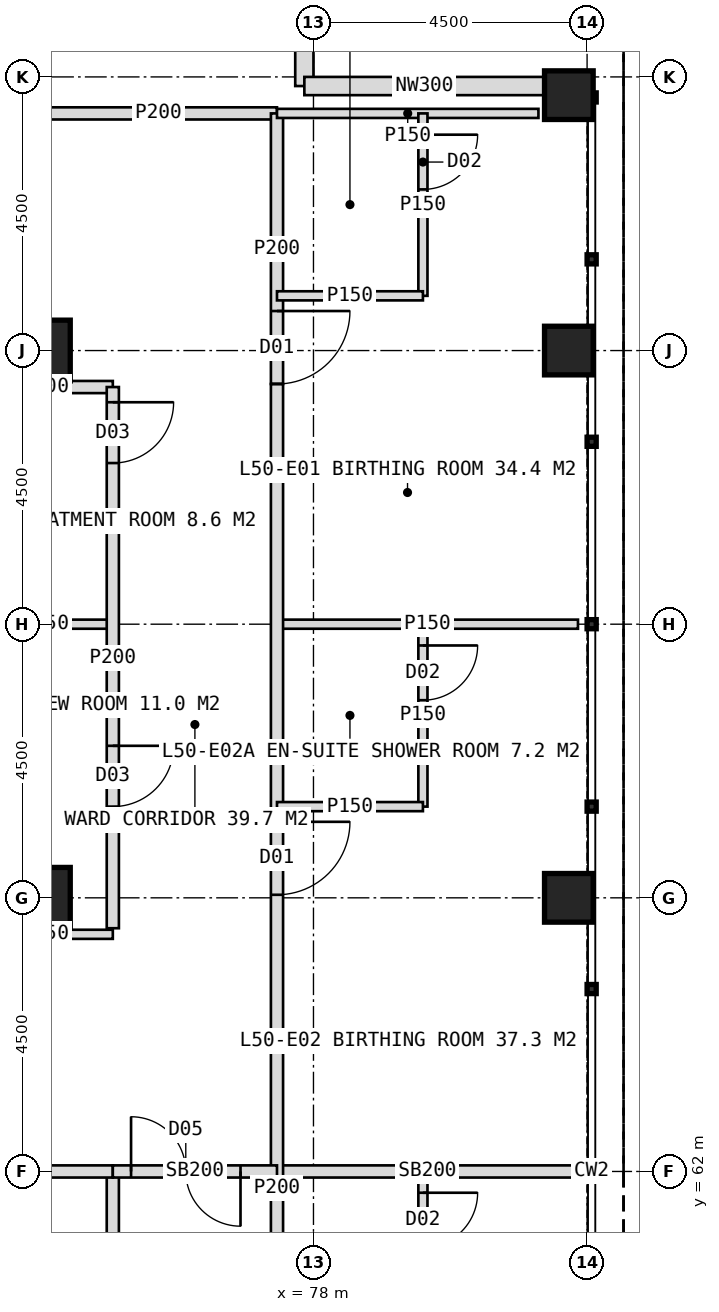
"""IFC4 building model, lengths in metres.
Left out: names, types, materials, properties, quantities, classifications, styles, units other than length and angle.
Written with IfcOpenShell. Run it as: python <this file> out.ifc"""

import sys

from ifc_helpers import new_model, si_unit, direction, frame, frame_2d, origin, origin_2d, place, context, subcontext, project, spatial, rectangle, hollow_rectangle, extrude, element, fill, save


model = new_model("IFC4")
c1 = context("Model", 3, precision=1e-05, world=origin(), true_north=direction((0.0, 1.0)))
c2 = subcontext(c1, "Body", "Model", "MODEL_VIEW")
j1 = project(units=[si_unit("LENGTHUNIT", "METRE"), si_unit("PLANEANGLEUNIT", "RADIAN")], contexts=[c1])
p1 = place(None, origin())
s1 = spatial("IfcSite", under=j1, at=p1, CompositionType="ELEMENT")
p2 = place(p1, origin())
s2 = spatial("IfcBuilding", under=s1, at=p2, CompositionType="ELEMENT")
p3 = place(p2, frame((0.0, 0.0, 209.0)))
s3 = spatial("IfcBuildingStorey", under=s2, at=p3, CompositionType="ELEMENT", Elevation=209.0)
for number, where, z_axis, x_axis in (
    (1, (73.5, 75.5, 0.0), (0.0, 0.0, 1.0), (1.0, 0.0, 0.0)),
    (2, (73.5, 66.5, 0.0), (0.0, 0.0, 1.0), (1.0, 0.0, 0.0)),
):
    element("IfcColumn", number, at=place(p3, frame(where, z_axis=z_axis, x_axis=x_axis)), inside=s3, PredefinedType="COLUMN", context=c2, shape_type="SweptSolid", body=[
        extrude(hollow_rectangle(XDim=1.0, YDim=1.0, WallThickness=0.1, at=origin_2d()), origin(), (0.0, 0.0, 1.0), 4.0),
    ])
for number, where, z_axis, x_axis in (
    (3, (82.2, 66.5, 0.0), (0.0, 0.0, 1.0), (1.0, 0.0, 0.0)),
    (4, (82.2, 75.5, 0.0), (0.0, 0.0, 1.0), (1.0, 0.0, 0.0)),
    (5, (82.2, 79.7, 0.0), (0.0, 0.0, 1.0), (1.0, 0.0, 0.0)),
):
    element("IfcColumn", number, at=place(p3, frame(where, z_axis=z_axis, x_axis=x_axis)), inside=s3, PredefinedType="COLUMN", context=c2, shape_type="SweptSolid", body=[
        extrude(hollow_rectangle(XDim=0.8, YDim=0.8, WallThickness=0.08, at=origin_2d()), origin(), (0.0, 0.0, 1.0), 4.0),
    ])
for number, where, z_axis, x_axis in (
    (6, (77.85, 83.8, 0.0), (0.0, 0.0, 1.0), (0.0, -1.0, 0.0)),
    (7, (77.85, 79.85, 0.0), (0.0, 0.0, 1.0), (1.0, 0.0, 0.0)),
):
    element("IfcWall", number, at=place(p3, frame(where, z_axis=z_axis, x_axis=x_axis)), inside=s3, PredefinedType="ELEMENTEDWALL", context=c2, shape_type="SweptSolid", body=[
        extrude(rectangle(XDim=3.95, YDim=0.3, at=frame_2d((1.975, 0.0))), origin(), (0.0, 0.0, 1.0), 2.85),
    ])
p4 = place(p3, frame((73.5, 79.4, 0.0), z_axis=(0.0, 0.0, 1.0), x_axis=(1.0, 0.0, 0.0)))
e8 = element("IfcWall", 8, at=p4, inside=s3, PredefinedType="PARTITIONING", context=c2, shape_type="SweptSolid", body=[
    extrude(rectangle(XDim=3.9, YDim=0.2, at=frame_2d((1.95, 0.0))), origin(), (0.0, 0.0, 1.0), 2.85),
])
p5 = place(p3, frame((72.5, 74.9, 0.0), z_axis=(0.0, 0.0, 1.0), x_axis=(1.0, 0.0, 0.0)))
e9 = element("IfcWall", 9, at=p5, inside=s3, PredefinedType="PARTITIONING", context=c2, shape_type="SweptSolid", body=[
    extrude(rectangle(XDim=2.2, YDim=0.2, at=frame_2d((1.1, 0.0))), origin(), (0.0, 0.0, 1.0), 3.75),
])
p6 = place(p3, frame((77.4, 71.0, 0.0), z_axis=(0.0, 0.0, 1.0), x_axis=(1.0, 0.0, 0.0)))
e10 = element("IfcWall", 10, at=p6, inside=s3, PredefinedType="PARTITIONING", context=c2, shape_type="SweptSolid", body=[
    extrude(rectangle(XDim=4.95, YDim=0.15, at=frame_2d((2.475, 0.0))), origin(), (0.0, 0.0, 1.0), 3.75),
])
p7 = place(p3, frame((77.4, 62.0, 0.0), z_axis=(0.0, 0.0, 1.0), x_axis=(1.0, 0.0, 0.0)))
e11 = element("IfcWall", 11, at=p7, inside=s3, PredefinedType="SOLIDWALL", context=c2, shape_type="SweptSolid", body=[
    extrude(rectangle(XDim=4.95, YDim=0.2, at=frame_2d((2.475, 0.0))), origin(), (0.0, 0.0, 1.0), 2.95),
])
p8 = place(p3, frame((77.4, 79.4, 0.0), z_axis=(0.0, 0.0, 1.0), x_axis=(0.0, -1.0, 0.0)))
e12 = element("IfcWall", 12, at=p8, inside=s3, PredefinedType="PARTITIONING", context=c2, shape_type="SweptSolid", body=[
    extrude(rectangle(XDim=4.45, YDim=0.2, at=frame_2d((2.225, 0.0))), origin(), (0.0, 0.0, 1.0), 2.85),
])
p9 = place(p8, frame((3.25, 0.0, 0.0)))
e13 = element("IfcOpeningElement", 13, at=p9, cuts=e12, PredefinedType="OPENING", context=c2, shape_type="SweptSolid", body=[
    extrude(rectangle(XDim=1.2, YDim=2.2, at=frame_2d((0.6, 1.1))), frame((0.0, 0.11, 0.0), z_axis=(0.0, -1.0, 0.0), x_axis=(1.0, 0.0, 0.0)), (0.0, 0.0, 1.0), 0.22),
])
p10 = place(p3, frame((77.4, 74.95, 0.0), z_axis=(0.0, 0.0, 1.0), x_axis=(0.0, -1.0, 0.0)))
e14 = element("IfcWall", 14, at=p10, inside=s3, PredefinedType="PARTITIONING", context=c2, shape_type="SweptSolid", body=[
    extrude(rectangle(XDim=26.45, YDim=0.2, at=frame_2d((13.225, 0.0))), origin(), (0.0, 0.0, 1.0), 3.75),
])
p11 = place(p10, frame((7.2, 0.0, 0.0)))
e15 = element("IfcOpeningElement", 15, at=p11, cuts=e14, PredefinedType="OPENING", context=c2, shape_type="SweptSolid", body=[
    extrude(rectangle(XDim=1.2, YDim=2.2, at=frame_2d((0.6, 1.1))), frame((0.0, 0.11, 0.0), z_axis=(0.0, -1.0, 0.0), x_axis=(1.0, 0.0, 0.0)), (0.0, 0.0, 1.0), 0.22),
])
p12 = place(p10, frame((16.2, 0.0, 0.0)))
e16 = element("IfcOpeningElement", 16, at=p12, cuts=e14, PredefinedType="OPENING", context=c2, shape_type="SweptSolid", body=[
    extrude(rectangle(XDim=1.2, YDim=2.2, at=frame_2d((0.6, 1.1))), frame((0.0, 0.11, 0.0), z_axis=(0.0, -1.0, 0.0), x_axis=(1.0, 0.0, 0.0)), (0.0, 0.0, 1.0), 0.22),
])
p13 = place(p10, frame((25.2, 0.0, 0.0)))
e17 = element("IfcOpeningElement", 17, at=p13, cuts=e14, PredefinedType="OPENING", context=c2, shape_type="SweptSolid", body=[
    extrude(rectangle(XDim=1.2, YDim=2.2, at=frame_2d((0.6, 1.1))), frame((0.0, 0.11, 0.0), z_axis=(0.0, -1.0, 0.0), x_axis=(1.0, 0.0, 0.0)), (0.0, 0.0, 1.0), 0.22),
])
p14 = place(p3, frame((77.4, 79.4, 0.0), z_axis=(0.0, 0.0, 1.0), x_axis=(1.0, 0.0, 0.0)))
e18 = element("IfcWall", 18, at=p14, inside=s3, PredefinedType="PARTITIONING", context=c2, shape_type="SweptSolid", body=[
    extrude(rectangle(XDim=4.3, YDim=0.15, at=frame_2d((2.15, 0.0))), origin(), (0.0, 0.0, 1.0), 2.85),
])
p15 = place(p3, frame((79.8, 79.4, 0.0), z_axis=(0.0, 0.0, 1.0), x_axis=(0.0, -1.0, 0.0)))
e19 = element("IfcWall", 19, at=p15, inside=s3, PredefinedType="PARTITIONING", context=c2, shape_type="SweptSolid", body=[
    extrude(rectangle(XDim=3.0, YDim=0.15, at=frame_2d((1.5, 0.0))), origin(), (0.0, 0.0, 1.0), 3.75),
])
p16 = place(p15, frame((0.35, 0.0, 0.0)))
e20 = element("IfcOpeningElement", 20, at=p16, cuts=e19, PredefinedType="OPENING", context=c2, shape_type="SweptSolid", body=[
    extrude(rectangle(XDim=0.9, YDim=2.1, at=frame_2d((0.45, 1.05))), frame((0.0, 0.085, 0.0), z_axis=(0.0, -1.0, 0.0), x_axis=(1.0, 0.0, 0.0)), (0.0, 0.0, 1.0), 0.17),
])
p17 = place(p3, frame((77.4, 76.4, 0.0), z_axis=(0.0, 0.0, 1.0), x_axis=(1.0, 0.0, 0.0)))
e21 = element("IfcWall", 21, at=p17, inside=s3, PredefinedType="PARTITIONING", context=c2, shape_type="SweptSolid", body=[
    extrude(rectangle(XDim=2.4, YDim=0.15, at=frame_2d((1.2, 0.0))), origin(), (0.0, 0.0, 1.0), 3.75),
])
p18 = place(p3, frame((79.8, 71.0, 0.0), z_axis=(0.0, 0.0, 1.0), x_axis=(0.0, -1.0, 0.0)))
e22 = element("IfcWall", 22, at=p18, inside=s3, PredefinedType="PARTITIONING", context=c2, shape_type="SweptSolid", body=[
    extrude(rectangle(XDim=3.0, YDim=0.15, at=frame_2d((1.5, 0.0))), origin(), (0.0, 0.0, 1.0), 3.75),
])
p19 = place(p18, frame((0.35, 0.0, 0.0)))
e23 = element("IfcOpeningElement", 23, at=p19, cuts=e22, PredefinedType="OPENING", context=c2, shape_type="SweptSolid", body=[
    extrude(rectangle(XDim=0.9, YDim=2.1, at=frame_2d((0.45, 1.05))), frame((0.0, 0.085, 0.0), z_axis=(0.0, -1.0, 0.0), x_axis=(1.0, 0.0, 0.0)), (0.0, 0.0, 1.0), 0.17),
])
p20 = place(p3, frame((77.4, 68.0, 0.0), z_axis=(0.0, 0.0, 1.0), x_axis=(1.0, 0.0, 0.0)))
e24 = element("IfcWall", 24, at=p20, inside=s3, PredefinedType="PARTITIONING", context=c2, shape_type="SweptSolid", body=[
    extrude(rectangle(XDim=2.4, YDim=0.15, at=frame_2d((1.2, 0.0))), origin(), (0.0, 0.0, 1.0), 3.75),
])
p21 = place(p3, frame((79.8, 62.0, 0.0), z_axis=(0.0, 0.0, 1.0), x_axis=(0.0, -1.0, 0.0)))
e25 = element("IfcWall", 25, at=p21, inside=s3, PredefinedType="PARTITIONING", context=c2, shape_type="SweptSolid", body=[
    extrude(rectangle(XDim=3.0, YDim=0.15, at=frame_2d((1.5, 0.0))), origin(), (0.0, 0.0, 1.0), 3.75),
])
p22 = place(p21, frame((0.35, 0.0, 0.0)))
e26 = element("IfcOpeningElement", 26, at=p22, cuts=e25, PredefinedType="OPENING", context=c2, shape_type="SweptSolid", body=[
    extrude(rectangle(XDim=0.9, YDim=2.1, at=frame_2d((0.45, 1.05))), frame((0.0, 0.085, 0.0), z_axis=(0.0, -1.0, 0.0), x_axis=(1.0, 0.0, 0.0)), (0.0, 0.0, 1.0), 0.17),
])
p23 = place(p3, frame((72.5, 71.0, 0.0), z_axis=(0.0, 0.0, 1.0), x_axis=(1.0, 0.0, 0.0)))
e27 = element("IfcWall", 27, at=p23, inside=s3, PredefinedType="PARTITIONING", context=c2, shape_type="SweptSolid", body=[
    extrude(rectangle(XDim=2.2, YDim=0.15, at=frame_2d((1.1, 0.0))), origin(), (0.0, 0.0, 1.0), 3.75),
])
p24 = place(p3, frame((74.7, 74.9, 0.0), z_axis=(0.0, 0.0, 1.0), x_axis=(0.0, -1.0, 0.0)))
e28 = element("IfcWall", 28, at=p24, inside=s3, PredefinedType="PARTITIONING", context=c2, shape_type="SweptSolid", body=[
    extrude(rectangle(XDim=8.9, YDim=0.2, at=frame_2d((4.45, 0.0))), origin(), (0.0, 0.0, 1.0), 3.75),
])
p25 = place(p24, frame((0.25, 0.0, 0.0)))
e29 = element("IfcOpeningElement", 29, at=p25, cuts=e28, PredefinedType="OPENING", context=c2, shape_type="SweptSolid", body=[
    extrude(rectangle(XDim=1.0, YDim=2.1, at=frame_2d((0.5, 1.05))), frame((0.0, 0.11, 0.0), z_axis=(0.0, -1.0, 0.0), x_axis=(1.0, 0.0, 0.0)), (0.0, 0.0, 1.0), 0.22),
])
p26 = place(p24, frame((5.9, 0.0, 0.0)))
e30 = element("IfcOpeningElement", 30, at=p26, cuts=e28, PredefinedType="OPENING", context=c2, shape_type="SweptSolid", body=[
    extrude(rectangle(XDim=1.0, YDim=2.1, at=frame_2d((0.5, 1.05))), frame((0.0, 0.11, 0.0), z_axis=(0.0, -1.0, 0.0), x_axis=(1.0, 0.0, 0.0)), (0.0, 0.0, 1.0), 0.22),
])
p27 = place(p3, frame((74.7, 62.0, 0.0), z_axis=(0.0, 0.0, 1.0), x_axis=(0.0, -1.0, 0.0)))
e31 = element("IfcWall", 31, at=p27, inside=s3, PredefinedType="PARTITIONING", context=c2, shape_type="SweptSolid", body=[
    extrude(rectangle(XDim=14.7, YDim=0.2, at=frame_2d((7.35, 0.0))), origin(), (0.0, 0.0, 1.0), 3.75),
])
p28 = place(p27, frame((1.45, 0.0, 0.0)))
e32 = element("IfcOpeningElement", 32, at=p28, cuts=e31, PredefinedType="OPENING", context=c2, shape_type="SweptSolid", body=[
    extrude(rectangle(XDim=1.0, YDim=2.1, at=frame_2d((0.5, 1.05))), frame((0.0, 0.11, 0.0), z_axis=(0.0, -1.0, 0.0), x_axis=(1.0, 0.0, 0.0)), (0.0, 0.0, 1.0), 0.22),
])
p29 = place(p27, frame((11.35, 0.0, 0.0)))
e33 = element("IfcOpeningElement", 33, at=p29, cuts=e31, PredefinedType="OPENING", context=c2, shape_type="SweptSolid", body=[
    extrude(rectangle(XDim=1.0, YDim=2.1, at=frame_2d((0.5, 1.05))), frame((0.0, 0.11, 0.0), z_axis=(0.0, -1.0, 0.0), x_axis=(1.0, 0.0, 0.0)), (0.0, 0.0, 1.0), 0.22),
])
p30 = place(p3, frame((72.5, 65.9, 0.0), z_axis=(0.0, 0.0, 1.0), x_axis=(1.0, 0.0, 0.0)))
e34 = element("IfcWall", 34, at=p30, inside=s3, PredefinedType="PARTITIONING", context=c2, shape_type="SweptSolid", body=[
    extrude(rectangle(XDim=2.2, YDim=0.15, at=frame_2d((1.1, 0.0))), origin(), (0.0, 0.0, 1.0), 3.75),
])
p31 = place(p3, frame((69.0, 62.0, 0.0), z_axis=(0.0, 0.0, 1.0), x_axis=(1.0, 0.0, 0.0)))
e35 = element("IfcWall", 35, at=p31, inside=s3, PredefinedType="SOLIDWALL", context=c2, shape_type="SweptSolid", body=[
    extrude(rectangle(XDim=5.7, YDim=0.2, at=frame_2d((2.85, 0.0))), origin(), (0.0, 0.0, 1.0), 2.95),
])
p32 = place(p3, frame((74.7, 62.0, 0.0), z_axis=(0.0, 0.0, 1.0), x_axis=(1.0, 0.0, 0.0)))
e36 = element("IfcWall", 36, at=p32, inside=s3, PredefinedType="SOLIDWALL", context=c2, shape_type="SweptSolid", body=[
    extrude(rectangle(XDim=2.7, YDim=0.2, at=frame_2d((1.35, 0.0))), origin(), (0.0, 0.0, 1.0), 2.95),
])
p33 = place(p32, frame((0.3, 0.0, 0.0)))
e37 = element("IfcOpeningElement", 37, at=p33, cuts=e36, PredefinedType="OPENING", context=c2, shape_type="SweptSolid", body=[
    extrude(rectangle(XDim=1.8, YDim=2.2, at=frame_2d((0.9, 1.1))), frame((0.0, 0.11, 0.0), z_axis=(0.0, -1.0, 0.0), x_axis=(1.0, 0.0, 0.0)), (0.0, 0.0, 1.0), 0.22),
])
p34 = place(p25, origin())
e38 = element("IfcDoor", 38, at=p34, inside=s3, OperationType="SINGLE_SWING_LEFT", PredefinedType="DOOR", context=c2, shape_type="SweptSolid", body=[
    extrude(rectangle(XDim=1.0, YDim=2.1, at=frame_2d((0.5, 1.05))), frame((0.0, 0.025, 0.0), z_axis=(0.0, -1.0, 0.0), x_axis=(1.0, 0.0, 0.0)), (0.0, 0.0, 1.0), 0.05),
])
fill(e29, e38)
p35 = place(p9, origin())
e39 = element("IfcDoor", 39, at=p35, inside=s3, OperationType="SINGLE_SWING_LEFT", PredefinedType="DOOR", context=c2, shape_type="SweptSolid", body=[
    extrude(rectangle(XDim=1.2, YDim=2.2, at=frame_2d((0.6, 1.1))), frame((0.0, 0.025, 0.0), z_axis=(0.0, -1.0, 0.0), x_axis=(1.0, 0.0, 0.0)), (0.0, 0.0, 1.0), 0.05),
])
fill(e13, e39)
p36 = place(p16, origin())
e40 = element("IfcDoor", 40, at=p36, inside=s3, OperationType="SINGLE_SWING_LEFT", PredefinedType="DOOR", context=c2, shape_type="SweptSolid", body=[
    extrude(rectangle(XDim=0.9, YDim=2.1, at=frame_2d((0.45, 1.05))), frame((0.0, 0.025, 0.0), z_axis=(0.0, -1.0, 0.0), x_axis=(1.0, 0.0, 0.0)), (0.0, 0.0, 1.0), 0.05),
])
fill(e20, e40)
p37 = place(p11, origin())
e41 = element("IfcDoor", 41, at=p37, inside=s3, OperationType="SINGLE_SWING_LEFT", PredefinedType="DOOR", context=c2, shape_type="SweptSolid", body=[
    extrude(rectangle(XDim=1.2, YDim=2.2, at=frame_2d((0.6, 1.1))), frame((0.0, 0.025, 0.0), z_axis=(0.0, -1.0, 0.0), x_axis=(1.0, 0.0, 0.0)), (0.0, 0.0, 1.0), 0.05),
])
fill(e15, e41)
p38 = place(p19, origin())
e42 = element("IfcDoor", 42, at=p38, inside=s3, OperationType="SINGLE_SWING_LEFT", PredefinedType="DOOR", context=c2, shape_type="SweptSolid", body=[
    extrude(rectangle(XDim=0.9, YDim=2.1, at=frame_2d((0.45, 1.05))), frame((0.0, 0.025, 0.0), z_axis=(0.0, -1.0, 0.0), x_axis=(1.0, 0.0, 0.0)), (0.0, 0.0, 1.0), 0.05),
])
fill(e23, e42)
p39 = place(p22, origin())
e43 = element("IfcDoor", 43, at=p39, inside=s3, OperationType="SINGLE_SWING_LEFT", PredefinedType="DOOR", context=c2, shape_type="SweptSolid", body=[
    extrude(rectangle(XDim=0.9, YDim=2.1, at=frame_2d((0.45, 1.05))), frame((0.0, 0.025, 0.0), z_axis=(0.0, -1.0, 0.0), x_axis=(1.0, 0.0, 0.0)), (0.0, 0.0, 1.0), 0.05),
])
fill(e26, e43)
p40 = place(p26, origin())
e44 = element("IfcDoor", 44, at=p40, inside=s3, OperationType="SINGLE_SWING_LEFT", PredefinedType="DOOR", context=c2, shape_type="SweptSolid", body=[
    extrude(rectangle(XDim=1.0, YDim=2.1, at=frame_2d((0.5, 1.05))), frame((0.0, 0.025, 0.0), z_axis=(0.0, -1.0, 0.0), x_axis=(1.0, 0.0, 0.0)), (0.0, 0.0, 1.0), 0.05),
])
fill(e30, e44)
p41 = place(p33, origin())
e45 = element("IfcDoor", 45, at=p41, inside=s3, OperationType="DOUBLE_DOOR_DOUBLE_SWING", PredefinedType="DOOR", context=c2, shape_type="SweptSolid", body=[
    extrude(rectangle(XDim=1.8, YDim=2.2, at=frame_2d((0.9, 1.1))), frame((0.0, 0.025, 0.0), z_axis=(0.0, -1.0, 0.0), x_axis=(1.0, 0.0, 0.0)), (0.0, 0.0, 1.0), 0.05),
])
fill(e37, e45)
save(model, sys.argv[1])
